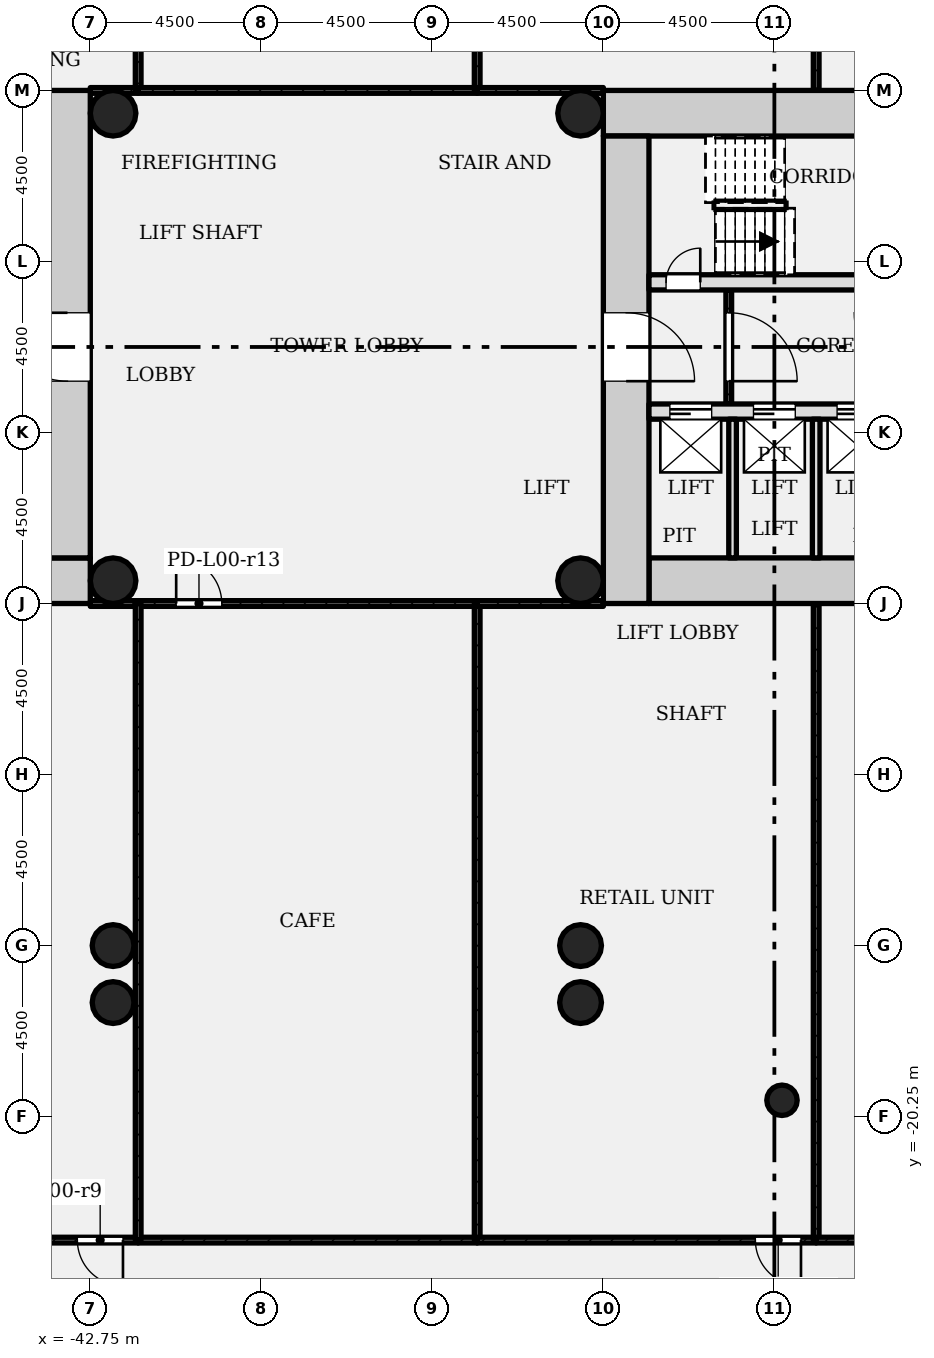
"""IFC4 building model, lengths in metres.
Left out: names, types, materials, properties, quantities, classifications, styles, units other than length and angle.
Written with IfcOpenShell. Run it as: python <this file> out.ifc"""

import sys

from ifc_helpers import new_model, si_unit, direction, frame, frame_2d, origin, origin_2d, place, context, subcontext, project, spatial, rectangle, hollow_circle, extrude, element, fill, save


model = new_model("IFC4")
c1 = context("Model", 3, precision=1e-05, world=origin(), true_north=direction((0.0, 1.0)))
c2 = subcontext(c1, "Body", "Model", "MODEL_VIEW")
j1 = project(units=[si_unit("LENGTHUNIT", "METRE"), si_unit("PLANEANGLEUNIT", "RADIAN")], contexts=[c1])
p1 = place(None, origin())
s1 = spatial("IfcSite", under=j1, at=p1, CompositionType="ELEMENT")
p2 = place(p1, origin())
s2 = spatial("IfcBuilding", under=s1, at=p2, CompositionType="ELEMENT")
p3 = place(p2, origin())
s3 = spatial("IfcBuildingStorey", under=s2, at=p3, CompositionType="ELEMENT", Elevation=0.0)
for number, where, z_axis, x_axis in (
    (1, (-28.05, -6.15, -0.4), (0.0, 0.0, 1.0), (1.0, 0.0, 0.0)),
    (2, (-21.45, 6.15, -0.4), (0.0, 0.0, 1.0), (-1.0, 0.0, 0.0)),
):
    element("IfcWall", number, at=place(p3, frame(where, z_axis=z_axis, x_axis=x_axis)), inside=s3, PredefinedType="SHEAR", context=c2, shape_type="SweptSolid", body=[
        extrude(rectangle(XDim=7.8, YDim=1.2, at=frame_2d((3.9, 0.0))), origin(), (0.0, 0.0, 1.0), 6.4),
    ])
p4 = place(p3, frame((-28.65, 5.55, -0.4), z_axis=(0.0, 0.0, 1.0), x_axis=(0.0, -1.0, 0.0)))
e3 = element("IfcWall", 3, at=p4, inside=s3, PredefinedType="SHEAR", context=c2, shape_type="SweptSolid", body=[
    extrude(rectangle(XDim=12.3, YDim=1.2, at=frame_2d((6.15, 0.0))), origin(), (0.0, 0.0, 1.0), 6.4),
])
p5 = place(p4, frame((4.65, 0.0, 0.4)))
e4 = element("IfcOpeningElement", 4, at=p5, cuts=e3, PredefinedType="OPENING", context=c2, shape_type="SweptSolid", body=[
    extrude(rectangle(XDim=1.8, YDim=2.1, at=frame_2d((0.9, 1.05))), frame((0.0, 0.61, 0.0), z_axis=(0.0, -1.0, 0.0), x_axis=(1.0, 0.0, 0.0)), (0.0, 0.0, 1.0), 1.22),
])
p6 = place(p3, frame((-28.05, -1.7, -0.4), z_axis=(0.0, 0.0, 1.0), x_axis=(1.0, 0.0, 0.0)))
e5 = element("IfcWall", 5, at=p6, inside=s3, PredefinedType="SHEAR", context=c2, shape_type="SweptSolid", body=[
    extrude(rectangle(XDim=6.6, YDim=0.4, at=frame_2d((3.3, 0.0))), origin(), (0.0, 0.0, 1.0), 6.4),
])
p7 = place(p6, frame((0.55, 0.0, 0.4)))
e6 = element("IfcOpeningElement", 6, at=p7, cuts=e5, PredefinedType="OPENING", context=c2, shape_type="SweptSolid", body=[
    extrude(rectangle(XDim=1.1, YDim=2.1, at=frame_2d((0.55, 1.05))), frame((0.0, 0.21, 0.0), z_axis=(0.0, -1.0, 0.0), x_axis=(1.0, 0.0, 0.0)), (0.0, 0.0, 1.0), 0.42),
])
p8 = place(p6, frame((2.75, 0.0, 0.4)))
e7 = element("IfcOpeningElement", 7, at=p8, cuts=e5, PredefinedType="OPENING", context=c2, shape_type="SweptSolid", body=[
    extrude(rectangle(XDim=1.1, YDim=2.1, at=frame_2d((0.55, 1.05))), frame((0.0, 0.21, 0.0), z_axis=(0.0, -1.0, 0.0), x_axis=(1.0, 0.0, 0.0)), (0.0, 0.0, 1.0), 0.42),
])
p9 = place(p6, frame((4.95, 0.0, 0.4)))
e8 = element("IfcOpeningElement", 8, at=p9, cuts=e5, PredefinedType="OPENING", context=c2, shape_type="SweptSolid", body=[
    extrude(rectangle(XDim=1.1, YDim=2.1, at=frame_2d((0.55, 1.05))), frame((0.0, 0.21, 0.0), z_axis=(0.0, -1.0, 0.0), x_axis=(1.0, 0.0, 0.0)), (0.0, 0.0, 1.0), 0.42),
])
p10 = place(p3, frame((-28.05, 1.7, -0.4), z_axis=(0.0, 0.0, 1.0), x_axis=(1.0, 0.0, 0.0)))
e9 = element("IfcWall", 9, at=p10, inside=s3, PredefinedType="SHEAR", context=c2, shape_type="SweptSolid", body=[
    extrude(rectangle(XDim=6.6, YDim=0.4, at=frame_2d((3.3, 0.0))), origin(), (0.0, 0.0, 1.0), 6.4),
])
p11 = place(p10, frame((0.45, 0.0, 0.4)))
e10 = element("IfcOpeningElement", 10, at=p11, cuts=e9, PredefinedType="OPENING", context=c2, shape_type="SweptSolid", body=[
    extrude(rectangle(XDim=0.9, YDim=2.1, at=frame_2d((0.45, 1.05))), frame((0.0, 0.21, 0.0), z_axis=(0.0, -1.0, 0.0), x_axis=(1.0, 0.0, 0.0)), (0.0, 0.0, 1.0), 0.42),
])
p12 = place(p3, frame((-50.55, -6.15, -0.4), z_axis=(0.0, 0.0, 1.0), x_axis=(1.0, 0.0, 0.0)))
e11 = element("IfcWall", 11, at=p12, inside=s3, PredefinedType="SHEAR", context=c2, shape_type="SweptSolid", body=[
    extrude(rectangle(XDim=7.8, YDim=1.2, at=frame_2d((3.9, 0.0))), origin(), (0.0, 0.0, 1.0), 6.4),
])
p13 = place(p3, frame((-43.35, -5.55, -0.4), z_axis=(0.0, 0.0, 1.0), x_axis=(0.0, 1.0, 0.0)))
e12 = element("IfcWall", 12, at=p13, inside=s3, PredefinedType="SHEAR", context=c2, shape_type="SweptSolid", body=[
    extrude(rectangle(XDim=12.3, YDim=1.2, at=frame_2d((6.15, 0.0))), origin(), (0.0, 0.0, 1.0), 6.4),
])
p14 = place(p13, frame((4.65, 0.0, 0.4)))
e13 = element("IfcOpeningElement", 13, at=p14, cuts=e12, PredefinedType="OPENING", context=c2, shape_type="SweptSolid", body=[
    extrude(rectangle(XDim=1.8, YDim=2.1, at=frame_2d((0.9, 1.05))), frame((0.0, 0.61, 0.0), z_axis=(0.0, -1.0, 0.0), x_axis=(1.0, 0.0, 0.0)), (0.0, 0.0, 1.0), 1.22),
])
for number, where, z_axis, x_axis in (
    (14, (-42.15, -15.75, -0.4), (0.0, 0.0, 1.0), (1.0, 0.0, 0.0)),
    (15, (-29.85, -15.75, -0.4), (0.0, 0.0, 1.0), (1.0, 0.0, 0.0)),
    (16, (-42.15, -17.25, -0.4), (0.0, 0.0, 1.0), (1.0, 0.0, 0.0)),
    (17, (-29.85, -17.25, -0.4), (0.0, 0.0, 1.0), (1.0, 0.0, 0.0)),
):
    element("IfcColumn", number, at=place(p3, frame(where, z_axis=z_axis, x_axis=x_axis)), inside=s3, PredefinedType="COLUMN", context=c2, shape_type="SweptSolid", body=[
        extrude(hollow_circle(Radius=0.55, WallThickness=0.04, at=origin_2d()), origin(), (0.0, 0.0, 1.0), 6.4),
    ])
for number, where, z_axis, x_axis in (
    (18, (-42.15, -6.15, -0.4), (0.0, 0.0, 1.0), (1.0, 0.0, 0.0)),
    (19, (-29.85, -6.15, -0.4), (0.0, 0.0, 1.0), (1.0, 0.0, 0.0)),
    (20, (-29.85, 6.15, -0.4), (0.0, 0.0, 1.0), (1.0, 0.0, 0.0)),
    (21, (-42.15, 6.15, -0.4), (0.0, 0.0, 1.0), (1.0, 0.0, 0.0)),
):
    element("IfcColumn", number, at=place(p3, frame(where, z_axis=z_axis, x_axis=x_axis)), inside=s3, PredefinedType="COLUMN", context=c2, shape_type="SweptSolid", body=[
        extrude(hollow_circle(Radius=0.6, WallThickness=0.045, at=origin_2d()), origin(), (0.0, 0.0, 1.0), 6.4),
    ])
p15 = place(p3, frame((-24.55, -19.821, -0.4), z_axis=(0.0, 0.0, 1.0), x_axis=(1.0, 0.0, 0.0)))
e22 = element("IfcColumn", 22, at=p15, inside=s3, PredefinedType="COLUMN", context=c2, shape_type="SweptSolid", body=[
    extrude(hollow_circle(Radius=0.4, WallThickness=0.028, at=origin_2d()), origin(), (0.0, 0.0, 1.0), 6.4),
])
p16 = place(p3, frame((-25.95, -1.5, 0.0), z_axis=(0.0, 0.0, 1.0), x_axis=(0.0, 1.0, 0.0)))
e23 = element("IfcWall", 23, at=p16, inside=s3, PredefinedType="PARTITIONING", context=c2, shape_type="SweptSolid", body=[
    extrude(rectangle(XDim=3.0, YDim=0.15, at=frame_2d((1.5, 0.0))), origin(), (0.0, 0.0, 1.0), 5.58),
])
p17 = place(p16, frame((0.6, 0.0, 0.0)))
e24 = element("IfcOpeningElement", 24, at=p17, cuts=e23, PredefinedType="OPENING", context=c2, shape_type="SweptSolid", body=[
    extrude(rectangle(XDim=1.8, YDim=2.1, at=frame_2d((0.9, 1.05))), frame((0.0, 0.085, 0.0), z_axis=(0.0, -1.0, 0.0), x_axis=(1.0, 0.0, 0.0)), (0.0, 0.0, 1.0), 0.17),
])
for number, where, z_axis, x_axis in (
    (25, (-25.85, -5.55, 0.0), (0.0, 0.0, 1.0), (0.0, 1.0, 0.0)),
    (26, (-23.65, -5.55, 0.0), (0.0, 0.0, 1.0), (0.0, 1.0, 0.0)),
):
    element("IfcWall", number, at=place(p3, frame(where, z_axis=z_axis, x_axis=x_axis)), inside=s3, PredefinedType="SOLIDWALL", context=c2, shape_type="SweptSolid", body=[
        extrude(rectangle(XDim=3.65, YDim=0.2, at=frame_2d((1.825, 0.0))), origin(), (0.0, 0.0, 1.0), 5.58),
    ])
p18 = place(p3, frame((-42.75, -6.75, 0.0), z_axis=(0.0, 0.0, 1.0), x_axis=(1.0, 0.0, 0.0)))
e27 = element("IfcWall", 27, at=p18, inside=s3, PredefinedType="PARTITIONING", context=c2, shape_type="SweptSolid", body=[
    extrude(rectangle(XDim=1.26, YDim=0.15, at=frame_2d((0.63, 0.0))), origin(), (0.0, 0.0, 1.0), 5.58),
])
p19 = place(p3, frame((-41.49, -23.5, 0.0), z_axis=(0.0, 0.0, 1.0), x_axis=(-1.0, 0.0, 0.0)))
e28 = element("IfcWall", 28, at=p19, inside=s3, PredefinedType="PARTITIONING", context=c2, shape_type="SweptSolid", body=[
    extrude(rectangle(XDim=8.92, YDim=0.15, at=frame_2d((4.46, 0.0))), origin(), (0.0, 0.0, 1.0), 5.58),
])
p20 = place(p19, frame((0.4, 0.0, 0.0)))
e29 = element("IfcOpeningElement", 29, at=p20, cuts=e28, PredefinedType="OPENING", context=c2, shape_type="SweptSolid", body=[
    extrude(rectangle(XDim=1.2, YDim=2.1, at=frame_2d((0.6, 1.05))), frame((0.0, 0.085, 0.0), z_axis=(0.0, -1.0, 0.0), x_axis=(1.0, 0.0, 0.0)), (0.0, 0.0, 1.0), 0.17),
])
p21 = place(p3, frame((-41.49, 6.75, 0.0), z_axis=(0.0, 0.0, 1.0), x_axis=(-1.0, 0.0, 0.0)))
e30 = element("IfcWall", 30, at=p21, inside=s3, PredefinedType="PARTITIONING", context=c2, shape_type="SweptSolid", body=[
    extrude(rectangle(XDim=1.26, YDim=0.15, at=frame_2d((0.63, 0.0))), origin(), (0.0, 0.0, 1.0), 5.58),
])
p22 = place(p3, frame((-41.49, 26.5, 0.0), z_axis=(0.0, 0.0, 1.0), x_axis=(0.0, -1.0, 0.0)))
e31 = element("IfcWall", 31, at=p22, inside=s3, PredefinedType="PARTITIONING", context=c2, shape_type="SweptSolid", body=[
    extrude(rectangle(XDim=19.75, YDim=0.15, at=frame_2d((9.875, 0.0))), origin(), (0.0, 0.0, 1.0), 5.58),
])
p23 = place(p3, frame((-41.49, -6.75, 0.0), z_axis=(0.0, 0.0, 1.0), x_axis=(1.0, 0.0, 0.0)))
e32 = element("IfcWall", 32, at=p23, inside=s3, PredefinedType="PARTITIONING", context=c2, shape_type="SweptSolid", body=[
    extrude(rectangle(XDim=8.92, YDim=0.15, at=frame_2d((4.46, 0.0))), origin(), (0.0, 0.0, 1.0), 5.58),
])
p24 = place(p23, frame((1.0, 0.0, 0.0)))
e33 = element("IfcOpeningElement", 33, at=p24, cuts=e32, PredefinedType="OPENING", context=c2, shape_type="SweptSolid", body=[
    extrude(rectangle(XDim=1.2, YDim=2.1, at=frame_2d((0.6, 1.05))), frame((0.0, 0.085, 0.0), z_axis=(0.0, -1.0, 0.0), x_axis=(1.0, 0.0, 0.0)), (0.0, 0.0, 1.0), 0.17),
])
p25 = place(p3, frame((-32.57, -23.5, 0.0), z_axis=(0.0, 0.0, 1.0), x_axis=(-1.0, 0.0, 0.0)))
e34 = element("IfcWall", 34, at=p25, inside=s3, PredefinedType="PARTITIONING", context=c2, shape_type="SweptSolid", body=[
    extrude(rectangle(XDim=8.92, YDim=0.15, at=frame_2d((4.46, 0.0))), origin(), (0.0, 0.0, 1.0), 5.58),
])
for number, where, z_axis, x_axis in (
    (35, (-41.49, -23.5, 0.0), (0.0, 0.0, 1.0), (0.0, 1.0, 0.0)),
    (36, (-32.57, -6.75, 0.0), (0.0, 0.0, 1.0), (0.0, -1.0, 0.0)),
):
    element("IfcWall", number, at=place(p3, frame(where, z_axis=z_axis, x_axis=x_axis)), inside=s3, PredefinedType="PARTITIONING", context=c2, shape_type="SweptSolid", body=[
        extrude(rectangle(XDim=16.75, YDim=0.15, at=frame_2d((8.375, 0.0))), origin(), (0.0, 0.0, 1.0), 5.58),
    ])
p26 = place(p3, frame((-32.57, 6.75, 0.0), z_axis=(0.0, 0.0, 1.0), x_axis=(-1.0, 0.0, 0.0)))
e37 = element("IfcWall", 37, at=p26, inside=s3, PredefinedType="PARTITIONING", context=c2, shape_type="SweptSolid", body=[
    extrude(rectangle(XDim=8.92, YDim=0.15, at=frame_2d((4.46, 0.0))), origin(), (0.0, 0.0, 1.0), 5.58),
])
p27 = place(p3, frame((-32.57, 26.5, 0.0), z_axis=(0.0, 0.0, 1.0), x_axis=(0.0, -1.0, 0.0)))
e38 = element("IfcWall", 38, at=p27, inside=s3, PredefinedType="PARTITIONING", context=c2, shape_type="SweptSolid", body=[
    extrude(rectangle(XDim=19.75, YDim=0.15, at=frame_2d((9.875, 0.0))), origin(), (0.0, 0.0, 1.0), 5.58),
])
p28 = place(p3, frame((-32.57, -6.75, 0.0), z_axis=(0.0, 0.0, 1.0), x_axis=(1.0, 0.0, 0.0)))
e39 = element("IfcWall", 39, at=p28, inside=s3, PredefinedType="PARTITIONING", context=c2, shape_type="SweptSolid", body=[
    extrude(rectangle(XDim=3.32, YDim=0.15, at=frame_2d((1.66, 0.0))), origin(), (0.0, 0.0, 1.0), 5.58),
])
p29 = place(p3, frame((-23.65, -23.5, 0.0), z_axis=(0.0, 0.0, 1.0), x_axis=(-1.0, 0.0, 0.0)))
e40 = element("IfcWall", 40, at=p29, inside=s3, PredefinedType="PARTITIONING", context=c2, shape_type="SweptSolid", body=[
    extrude(rectangle(XDim=8.92, YDim=0.15, at=frame_2d((4.46, 0.0))), origin(), (0.0, 0.0, 1.0), 5.58),
])
p30 = place(p29, frame((0.4, 0.0, 0.0)))
e41 = element("IfcOpeningElement", 41, at=p30, cuts=e40, PredefinedType="OPENING", context=c2, shape_type="SweptSolid", body=[
    extrude(rectangle(XDim=1.2, YDim=2.1, at=frame_2d((0.6, 1.05))), frame((0.0, 0.085, 0.0), z_axis=(0.0, -1.0, 0.0), x_axis=(1.0, 0.0, 0.0)), (0.0, 0.0, 1.0), 0.17),
])
p31 = place(p3, frame((-23.65, -6.75, 0.0), z_axis=(0.0, 0.0, 1.0), x_axis=(0.0, -1.0, 0.0)))
e42 = element("IfcWall", 42, at=p31, inside=s3, PredefinedType="PARTITIONING", context=c2, shape_type="SweptSolid", body=[
    extrude(rectangle(XDim=16.75, YDim=0.15, at=frame_2d((8.375, 0.0))), origin(), (0.0, 0.0, 1.0), 5.58),
])
p32 = place(p3, frame((-29.25, 6.75, 0.0), z_axis=(0.0, 0.0, 1.0), x_axis=(-1.0, 0.0, 0.0)))
e43 = element("IfcWall", 43, at=p32, inside=s3, PredefinedType="PARTITIONING", context=c2, shape_type="SweptSolid", body=[
    extrude(rectangle(XDim=3.32, YDim=0.15, at=frame_2d((1.66, 0.0))), origin(), (0.0, 0.0, 1.0), 5.58),
])
p33 = place(p3, frame((-23.65, 26.5, 0.0), z_axis=(0.0, 0.0, 1.0), x_axis=(0.0, -1.0, 0.0)))
e44 = element("IfcWall", 44, at=p33, inside=s3, PredefinedType="PARTITIONING", context=c2, shape_type="SweptSolid", body=[
    extrude(rectangle(XDim=19.75, YDim=0.15, at=frame_2d((9.875, 0.0))), origin(), (0.0, 0.0, 1.0), 5.58),
])
p34 = place(p3, frame((-14.73, -23.5, 0.0), z_axis=(0.0, 0.0, 1.0), x_axis=(-1.0, 0.0, 0.0)))
e45 = element("IfcWall", 45, at=p34, inside=s3, PredefinedType="PARTITIONING", context=c2, shape_type="SweptSolid", body=[
    extrude(rectangle(XDim=8.92, YDim=0.15, at=frame_2d((4.46, 0.0))), origin(), (0.0, 0.0, 1.0), 5.58),
])
p35 = place(p34, frame((0.4, 0.0, 0.0)))
e46 = element("IfcOpeningElement", 46, at=p35, cuts=e45, PredefinedType="OPENING", context=c2, shape_type="SweptSolid", body=[
    extrude(rectangle(XDim=1.2, YDim=2.1, at=frame_2d((0.6, 1.05))), frame((0.0, 0.085, 0.0), z_axis=(0.0, -1.0, 0.0), x_axis=(1.0, 0.0, 0.0)), (0.0, 0.0, 1.0), 0.17),
])
p36 = place(p17, origin())
e47 = element("IfcDoor", 47, at=p36, inside=s3, OperationType="SINGLE_SWING_LEFT", PredefinedType="DOOR", context=c2, shape_type="SweptSolid", body=[
    extrude(rectangle(XDim=1.8, YDim=2.1, at=frame_2d((0.9, 1.05))), frame((0.0, 0.025, 0.0), z_axis=(0.0, -1.0, 0.0), x_axis=(1.0, 0.0, 0.0)), (0.0, 0.0, 1.0), 0.05),
])
fill(e24, e47)
p37 = place(p20, origin())
e48 = element("IfcDoor", 48, at=p37, inside=s3, OperationType="SINGLE_SWING_RIGHT", PredefinedType="DOOR", context=c2, shape_type="SweptSolid", body=[
    extrude(rectangle(XDim=1.2, YDim=2.1, at=frame_2d((0.6, 1.05))), frame((0.0, 0.025, 0.0), z_axis=(0.0, -1.0, 0.0), x_axis=(1.0, 0.0, 0.0)), (0.0, 0.0, 1.0), 0.05),
])
fill(e29, e48)
p38 = place(p24, origin())
e49 = element("IfcDoor", 49, at=p38, inside=s3, OperationType="SINGLE_SWING_RIGHT", PredefinedType="DOOR", context=c2, shape_type="SweptSolid", body=[
    extrude(rectangle(XDim=1.2, YDim=2.1, at=frame_2d((0.6, 1.05))), frame((0.0, 0.025, 0.0), z_axis=(0.0, -1.0, 0.0), x_axis=(1.0, 0.0, 0.0)), (0.0, 0.0, 1.0), 0.05),
])
fill(e33, e49)
p39 = place(p30, origin())
e50 = element("IfcDoor", 50, at=p39, inside=s3, OperationType="SINGLE_SWING_RIGHT", PredefinedType="DOOR", context=c2, shape_type="SweptSolid", body=[
    extrude(rectangle(XDim=1.2, YDim=2.1, at=frame_2d((0.6, 1.05))), frame((0.0, 0.025, 0.0), z_axis=(0.0, -1.0, 0.0), x_axis=(1.0, 0.0, 0.0)), (0.0, 0.0, 1.0), 0.05),
])
fill(e41, e50)
p40 = place(p11, origin())
e51 = element("IfcDoor", 51, at=p40, inside=s3, OperationType="SINGLE_SWING_LEFT", PredefinedType="DOOR", context=c2, shape_type="SweptSolid", body=[
    extrude(rectangle(XDim=0.9, YDim=2.1, at=frame_2d((0.45, 1.05))), frame((0.0, 0.025, 0.0), z_axis=(0.0, -1.0, 0.0), x_axis=(1.0, 0.0, 0.0)), (0.0, 0.0, 1.0), 0.05),
])
fill(e10, e51)
p41 = place(p7, origin())
e52 = element("IfcDoor", 52, at=p41, inside=s3, OperationType="SLIDING_TO_LEFT", PredefinedType="DOOR", context=c2, shape_type="SweptSolid", body=[
    extrude(rectangle(XDim=1.1, YDim=2.1, at=frame_2d((0.55, 1.05))), frame((0.0, 0.025, 0.0), z_axis=(0.0, -1.0, 0.0), x_axis=(1.0, 0.0, 0.0)), (0.0, 0.0, 1.0), 0.05),
])
fill(e6, e52)
p42 = place(p8, origin())
e53 = element("IfcDoor", 53, at=p42, inside=s3, OperationType="SLIDING_TO_LEFT", PredefinedType="DOOR", context=c2, shape_type="SweptSolid", body=[
    extrude(rectangle(XDim=1.1, YDim=2.1, at=frame_2d((0.55, 1.05))), frame((0.0, 0.025, 0.0), z_axis=(0.0, -1.0, 0.0), x_axis=(1.0, 0.0, 0.0)), (0.0, 0.0, 1.0), 0.05),
])
fill(e7, e53)
p43 = place(p9, origin())
e54 = element("IfcDoor", 54, at=p43, inside=s3, OperationType="SLIDING_TO_LEFT", PredefinedType="DOOR", context=c2, shape_type="SweptSolid", body=[
    extrude(rectangle(XDim=1.1, YDim=2.1, at=frame_2d((0.55, 1.05))), frame((0.0, 0.025, 0.0), z_axis=(0.0, -1.0, 0.0), x_axis=(1.0, 0.0, 0.0)), (0.0, 0.0, 1.0), 0.05),
])
fill(e8, e54)
p44 = place(p5, origin())
e55 = element("IfcDoor", 55, at=p44, inside=s3, OperationType="SINGLE_SWING_LEFT", PredefinedType="DOOR", context=c2, shape_type="SweptSolid", body=[
    extrude(rectangle(XDim=1.8, YDim=2.1, at=frame_2d((0.9, 1.05))), frame((0.0, 0.025, 0.0), z_axis=(0.0, -1.0, 0.0), x_axis=(1.0, 0.0, 0.0)), (0.0, 0.0, 1.0), 0.05),
])
fill(e4, e55)
p45 = place(p14, origin())
e56 = element("IfcDoor", 56, at=p45, inside=s3, OperationType="SINGLE_SWING_LEFT", PredefinedType="DOOR", context=c2, shape_type="SweptSolid", body=[
    extrude(rectangle(XDim=1.8, YDim=2.1, at=frame_2d((0.9, 1.05))), frame((0.0, 0.025, 0.0), z_axis=(0.0, -1.0, 0.0), x_axis=(1.0, 0.0, 0.0)), (0.0, 0.0, 1.0), 0.05),
])
fill(e13, e56)
save(model, sys.argv[1])
